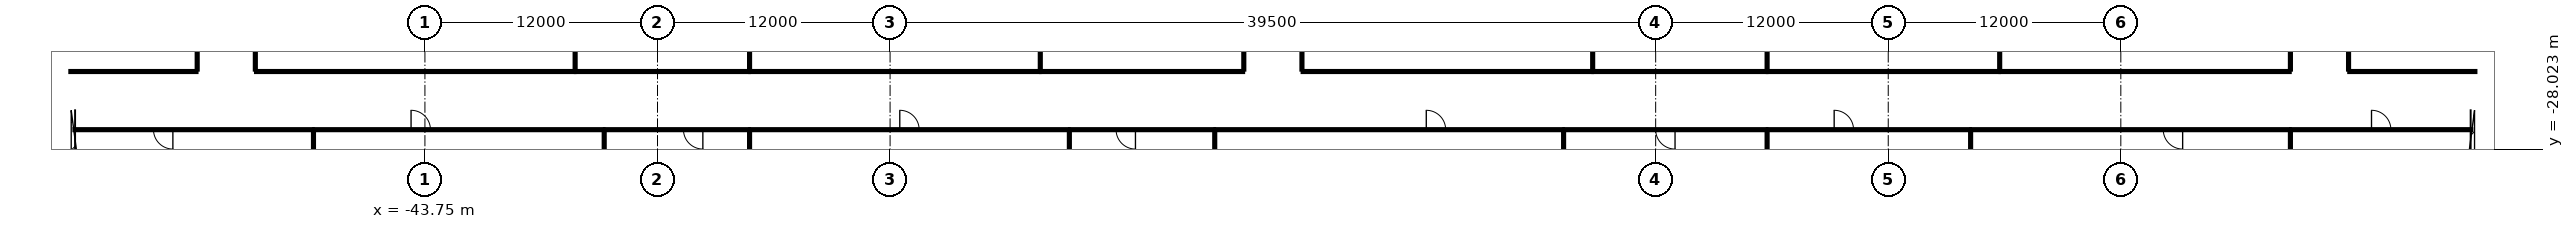
"""IFC4 building model, lengths in metres.
Left out: names, types, materials, properties, quantities, classifications, styles, units other than length and angle.
Written with IfcOpenShell. Run it as: python <this file> out.ifc"""

import sys

from ifc_helpers import new_model, si_unit, direction, frame, frame_2d, origin, origin_2d, place, context, subcontext, project, spatial, rectangle, hollow_rectangle, circle, extrude, element, fill, save


model = new_model("IFC4")
c1 = context("Model", 3, precision=1e-05, world=origin(), true_north=direction((0.0, 1.0)))
c2 = subcontext(c1, "Body", "Model", "MODEL_VIEW")
j1 = project(units=[si_unit("LENGTHUNIT", "METRE"), si_unit("PLANEANGLEUNIT", "RADIAN")], contexts=[c1])
p1 = place(None, origin())
s1 = spatial("IfcSite", under=j1, at=p1, CompositionType="ELEMENT")
p2 = place(p1, origin())
s2 = spatial("IfcBuilding", under=s1, at=p2, CompositionType="ELEMENT")
p3 = place(p2, frame((0.0, 0.0, 12.0)))
s3 = spatial("IfcBuildingStorey", under=s2, at=p3, CompositionType="ELEMENT", Elevation=12.0)
p4 = place(p3, frame((-59.4, -26.0, 0.0), z_axis=(0.0, 0.0, 1.0), x_axis=(1.0, 0.0, 0.0)))
e1 = element("IfcColumn", 1, at=p4, inside=s3, PredefinedType="COLUMN", context=c2, shape_type="SweptSolid", body=[
    extrude(circle(Radius=0.6, at=origin_2d()), origin(), (0.0, 0.0, 1.0), 4.2),
])
for number, where, z_axis, x_axis in (
    (2, (-54.6, -26.0, 0.0), (0.0, 0.0, 1.0), (1.0, 0.0, 0.0)),
    (3, (-37.8, -26.0, 0.0), (0.0, 0.0, 1.0), (1.0, 0.0, 0.0)),
    (4, (-21.0, -26.0, 0.0), (0.0, 0.0, 1.0), (1.0, 0.0, 0.0)),
    (5, (-4.2, -26.0, 0.0), (0.0, 0.0, 1.0), (1.0, 0.0, 0.0)),
    (6, (4.2, -26.0, 0.0), (0.0, 0.0, 1.0), (1.0, 0.0, 0.0)),
    (7, (12.6, -26.0, 0.0), (0.0, 0.0, 1.0), (1.0, 0.0, 0.0)),
    (8, (54.6, -26.0, 0.0), (0.0, 0.0, 1.0), (1.0, 0.0, 0.0)),
):
    element("IfcColumn", number, at=place(p3, frame(where, z_axis=z_axis, x_axis=x_axis)), inside=s3, PredefinedType="COLUMN", context=c2, shape_type="SweptSolid", body=[
        extrude(circle(Radius=0.6, at=origin_2d()), origin(), (0.0, 0.0, 1.0), 4.5),
    ])
p5 = place(p3, frame((59.4, -26.0, 0.0), z_axis=(0.0, 0.0, 1.0), x_axis=(1.0, 0.0, 0.0)))
e9 = element("IfcColumn", 9, at=p5, inside=s3, PredefinedType="COLUMN", context=c2, shape_type="SweptSolid", body=[
    extrude(circle(Radius=0.6, at=origin_2d()), origin(), (0.0, 0.0, 1.0), 4.2),
])
p6 = place(p3, frame((25.643, -22.79, 0.0), z_axis=(0.0, 0.0, 1.0), x_axis=(-0.258819045103, -0.965925826289, 0.0)))
e10 = element("IfcColumn", 10, at=p6, inside=s3, PredefinedType="COLUMN", context=c2, shape_type="SweptSolid", body=[
    extrude(hollow_rectangle(XDim=1.5, YDim=1.5, WallThickness=0.07, at=origin_2d()), origin(), (0.0, 0.0, 1.0), 4.5),
])
p7 = place(p3, frame((-61.868, -27.0, 0.0), z_axis=(0.0, 0.0, 1.0), x_axis=(1.0, 0.0, 0.0)))
e11 = element("IfcWall", 11, at=p7, inside=s3, PredefinedType="PARTITIONING", context=c2, shape_type="SweptSolid", body=[
    extrude(rectangle(XDim=12.368, YDim=0.125, at=frame_2d((6.184, 0.0))), origin(), (0.0, 0.0, 1.0), 2.68),
])
p8 = place(p7, frame((4.114, 0.0, 0.0)))
e12 = element("IfcOpeningElement", 12, at=p8, cuts=e11, PredefinedType="OPENING", context=c2, shape_type="SweptSolid", body=[
    extrude(rectangle(XDim=1.0, YDim=2.1, at=frame_2d((0.5, 1.05))), frame((0.0, 0.073, 0.0), z_axis=(0.0, -1.0, 0.0), x_axis=(1.0, 0.0, 0.0)), (0.0, 0.0, 1.0), 0.145),
])
p9 = place(p3, frame((-49.5, -27.0, 0.0), z_axis=(0.0, 0.0, 1.0), x_axis=(1.0, 0.0, 0.0)))
e13 = element("IfcWall", 13, at=p9, inside=s3, PredefinedType="PARTITIONING", context=c2, shape_type="SweptSolid", body=[
    extrude(rectangle(XDim=15.0, YDim=0.125, at=frame_2d((7.5, 0.0))), origin(), (0.0, 0.0, 1.0), 2.68),
])
p10 = place(p9, frame((5.035, 0.0, 0.0)))
e14 = element("IfcOpeningElement", 14, at=p10, cuts=e13, PredefinedType="OPENING", context=c2, shape_type="SweptSolid", body=[
    extrude(rectangle(XDim=1.0, YDim=2.4, at=frame_2d((0.5, 1.2))), frame((0.0, 0.073, 0.0), z_axis=(0.0, -1.0, 0.0), x_axis=(1.0, 0.0, 0.0)), (0.0, 0.0, 1.0), 0.145),
])
p11 = place(p3, frame((-34.5, -27.0, 0.0), z_axis=(0.0, 0.0, 1.0), x_axis=(1.0, 0.0, 0.0)))
e15 = element("IfcWall", 15, at=p11, inside=s3, PredefinedType="PARTITIONING", context=c2, shape_type="SweptSolid", body=[
    extrude(rectangle(XDim=7.5, YDim=0.125, at=frame_2d((3.75, 0.0))), origin(), (0.0, 0.0, 1.0), 2.68),
])
p12 = place(p11, frame((4.09, 0.0, 0.0)))
e16 = element("IfcOpeningElement", 16, at=p12, cuts=e15, PredefinedType="OPENING", context=c2, shape_type="SweptSolid", body=[
    extrude(rectangle(XDim=1.0, YDim=2.1, at=frame_2d((0.5, 1.05))), frame((0.0, 0.073, 0.0), z_axis=(0.0, -1.0, 0.0), x_axis=(1.0, 0.0, 0.0)), (0.0, 0.0, 1.0), 0.145),
])
p13 = place(p3, frame((-27.0, -27.0, 0.0), z_axis=(0.0, 0.0, 1.0), x_axis=(1.0, 0.0, 0.0)))
e17 = element("IfcWall", 17, at=p13, inside=s3, PredefinedType="PARTITIONING", context=c2, shape_type="SweptSolid", body=[
    extrude(rectangle(XDim=16.5, YDim=0.125, at=frame_2d((8.25, 0.0))), origin(), (0.0, 0.0, 1.0), 2.68),
])
p14 = place(p13, frame((7.75, 0.0, 0.0)))
e18 = element("IfcOpeningElement", 18, at=p14, cuts=e17, PredefinedType="OPENING", context=c2, shape_type="SweptSolid", body=[
    extrude(rectangle(XDim=1.0, YDim=2.1, at=frame_2d((0.5, 1.05))), frame((0.0, 0.073, 0.0), z_axis=(0.0, -1.0, 0.0), x_axis=(1.0, 0.0, 0.0)), (0.0, 0.0, 1.0), 0.145),
])
p15 = place(p3, frame((-10.5, -27.0, 0.0), z_axis=(0.0, 0.0, 1.0), x_axis=(1.0, 0.0, 0.0)))
e19 = element("IfcWall", 19, at=p15, inside=s3, PredefinedType="PARTITIONING", context=c2, shape_type="SweptSolid", body=[
    extrude(rectangle(XDim=7.5, YDim=0.125, at=frame_2d((3.75, 0.0))), origin(), (0.0, 0.0, 1.0), 2.68),
])
p16 = place(p15, frame((2.41, 0.0, 0.0)))
e20 = element("IfcOpeningElement", 20, at=p16, cuts=e19, PredefinedType="OPENING", context=c2, shape_type="SweptSolid", body=[
    extrude(rectangle(XDim=1.0, YDim=2.1, at=frame_2d((0.5, 1.05))), frame((0.0, 0.073, 0.0), z_axis=(0.0, -1.0, 0.0), x_axis=(1.0, 0.0, 0.0)), (0.0, 0.0, 1.0), 0.145),
])
p17 = place(p3, frame((-3.0, -27.0, 0.0), z_axis=(0.0, 0.0, 1.0), x_axis=(1.0, 0.0, 0.0)))
e21 = element("IfcWall", 21, at=p17, inside=s3, PredefinedType="PARTITIONING", context=c2, shape_type="SweptSolid", body=[
    extrude(rectangle(XDim=18.0, YDim=0.125, at=frame_2d((9.0, 0.0))), origin(), (0.0, 0.0, 1.0), 2.68),
])
p18 = place(p17, frame((10.915, 0.0, 0.0)))
e22 = element("IfcOpeningElement", 22, at=p18, cuts=e21, PredefinedType="OPENING", context=c2, shape_type="SweptSolid", body=[
    extrude(rectangle(XDim=1.0, YDim=2.1, at=frame_2d((0.5, 1.05))), frame((0.0, 0.073, 0.0), z_axis=(0.0, -1.0, 0.0), x_axis=(1.0, 0.0, 0.0)), (0.0, 0.0, 1.0), 0.145),
])
p19 = place(p3, frame((15.0, -27.0, 0.0), z_axis=(0.0, 0.0, 1.0), x_axis=(1.0, 0.0, 0.0)))
e23 = element("IfcWall", 23, at=p19, inside=s3, PredefinedType="PARTITIONING", context=c2, shape_type="SweptSolid", body=[
    extrude(rectangle(XDim=10.5, YDim=0.125, at=frame_2d((5.25, 0.0))), origin(), (0.0, 0.0, 1.0), 2.68),
])
p20 = place(p19, frame((4.75, 0.0, 0.0)))
e24 = element("IfcOpeningElement", 24, at=p20, cuts=e23, PredefinedType="OPENING", context=c2, shape_type="SweptSolid", body=[
    extrude(rectangle(XDim=1.0, YDim=2.4, at=frame_2d((0.5, 1.2))), frame((0.0, 0.073, 0.0), z_axis=(0.0, -1.0, 0.0), x_axis=(1.0, 0.0, 0.0)), (0.0, 0.0, 1.0), 0.145),
])
p21 = place(p3, frame((25.5, -27.0, 0.0), z_axis=(0.0, 0.0, 1.0), x_axis=(1.0, 0.0, 0.0)))
e25 = element("IfcWall", 25, at=p21, inside=s3, PredefinedType="PARTITIONING", context=c2, shape_type="SweptSolid", body=[
    extrude(rectangle(XDim=10.5, YDim=0.125, at=frame_2d((5.25, 0.0))), origin(), (0.0, 0.0, 1.0), 2.68),
])
p22 = place(p21, frame((3.46, 0.0, 0.0)))
e26 = element("IfcOpeningElement", 26, at=p22, cuts=e25, PredefinedType="OPENING", context=c2, shape_type="SweptSolid", body=[
    extrude(rectangle(XDim=1.0, YDim=2.1, at=frame_2d((0.5, 1.05))), frame((0.0, 0.073, 0.0), z_axis=(0.0, -1.0, 0.0), x_axis=(1.0, 0.0, 0.0)), (0.0, 0.0, 1.0), 0.145),
])
p23 = place(p3, frame((36.0, -27.0, 0.0), z_axis=(0.0, 0.0, 1.0), x_axis=(1.0, 0.0, 0.0)))
e27 = element("IfcWall", 27, at=p23, inside=s3, PredefinedType="PARTITIONING", context=c2, shape_type="SweptSolid", body=[
    extrude(rectangle(XDim=16.5, YDim=0.125, at=frame_2d((8.25, 0.0))), origin(), (0.0, 0.0, 1.0), 2.68),
])
p24 = place(p23, frame((9.94, 0.0, 0.0)))
e28 = element("IfcOpeningElement", 28, at=p24, cuts=e27, PredefinedType="OPENING", context=c2, shape_type="SweptSolid", body=[
    extrude(rectangle(XDim=1.0, YDim=2.1, at=frame_2d((0.5, 1.05))), frame((0.0, 0.073, 0.0), z_axis=(0.0, -1.0, 0.0), x_axis=(1.0, 0.0, 0.0)), (0.0, 0.0, 1.0), 0.145),
])
p25 = place(p3, frame((52.5, -27.0, 0.0), z_axis=(0.0, 0.0, 1.0), x_axis=(1.0, 0.0, 0.0)))
e29 = element("IfcWall", 29, at=p25, inside=s3, PredefinedType="PARTITIONING", context=c2, shape_type="SweptSolid", body=[
    extrude(rectangle(XDim=9.368, YDim=0.125, at=frame_2d((4.684, 0.0))), origin(), (0.0, 0.0, 1.0), 2.68),
])
p26 = place(p25, frame((4.184, 0.0, 0.0)))
e30 = element("IfcOpeningElement", 30, at=p26, cuts=e29, PredefinedType="OPENING", context=c2, shape_type="SweptSolid", body=[
    extrude(rectangle(XDim=1.0, YDim=2.1, at=frame_2d((0.5, 1.05))), frame((0.0, 0.073, 0.0), z_axis=(0.0, -1.0, 0.0), x_axis=(1.0, 0.0, 0.0)), (0.0, 0.0, 1.0), 0.145),
])
p27 = place(p3, frame((-55.5, -24.0, 0.0), z_axis=(0.0, 0.0, 1.0), x_axis=(-1.0, 0.0, 0.0)))
e31 = element("IfcWall", 31, at=p27, inside=s3, PredefinedType="PARTITIONING", context=c2, shape_type="SweptSolid", body=[
    extrude(rectangle(XDim=6.58, YDim=0.125, at=frame_2d((3.29, 0.0))), origin(), (0.0, 0.0, 1.0), 2.68),
])
p28 = place(p3, frame((-36.0, -24.0, 0.0), z_axis=(0.0, 0.0, 1.0), x_axis=(-1.0, 0.0, 0.0)))
e32 = element("IfcWall", 32, at=p28, inside=s3, PredefinedType="PARTITIONING", context=c2, shape_type="SweptSolid", body=[
    extrude(rectangle(XDim=16.5, YDim=0.125, at=frame_2d((8.25, 0.0))), origin(), (0.0, 0.0, 1.0), 2.68),
])
p29 = place(p3, frame((-27.0, -24.0, 0.0), z_axis=(0.0, 0.0, 1.0), x_axis=(-1.0, 0.0, 0.0)))
e33 = element("IfcWall", 33, at=p29, inside=s3, PredefinedType="PARTITIONING", context=c2, shape_type="SweptSolid", body=[
    extrude(rectangle(XDim=9.0, YDim=0.125, at=frame_2d((4.5, 0.0))), origin(), (0.0, 0.0, 1.0), 2.68),
])
p30 = place(p3, frame((-12.0, -24.0, 0.0), z_axis=(0.0, 0.0, 1.0), x_axis=(-1.0, 0.0, 0.0)))
e34 = element("IfcWall", 34, at=p30, inside=s3, PredefinedType="PARTITIONING", context=c2, shape_type="SweptSolid", body=[
    extrude(rectangle(XDim=15.0, YDim=0.125, at=frame_2d((7.5, 0.0))), origin(), (0.0, 0.0, 1.0), 2.68),
])
p31 = place(p3, frame((-1.5, -24.0, 0.0), z_axis=(0.0, 0.0, 1.0), x_axis=(-1.0, 0.0, 0.0)))
e35 = element("IfcWall", 35, at=p31, inside=s3, PredefinedType="PARTITIONING", context=c2, shape_type="SweptSolid", body=[
    extrude(rectangle(XDim=10.5, YDim=0.125, at=frame_2d((5.25, 0.0))), origin(), (0.0, 0.0, 1.0), 2.68),
])
p32 = place(p3, frame((16.5, -24.0, 0.0), z_axis=(0.0, 0.0, 1.0), x_axis=(-1.0, 0.0, 0.0)))
e36 = element("IfcWall", 36, at=p32, inside=s3, PredefinedType="PARTITIONING", context=c2, shape_type="SweptSolid", body=[
    extrude(rectangle(XDim=15.0, YDim=0.125, at=frame_2d((7.5, 0.0))), origin(), (0.0, 0.0, 1.0), 2.68),
])
p33 = place(p3, frame((25.5, -24.0, 0.0), z_axis=(0.0, 0.0, 1.0), x_axis=(-1.0, 0.0, 0.0)))
e37 = element("IfcWall", 37, at=p33, inside=s3, PredefinedType="PARTITIONING", context=c2, shape_type="SweptSolid", body=[
    extrude(rectangle(XDim=9.0, YDim=0.125, at=frame_2d((4.5, 0.0))), origin(), (0.0, 0.0, 1.0), 4.2),
])
p34 = place(p3, frame((37.5, -24.0, 0.0), z_axis=(0.0, 0.0, 1.0), x_axis=(-1.0, 0.0, 0.0)))
e38 = element("IfcWall", 38, at=p34, inside=s3, PredefinedType="PARTITIONING", context=c2, shape_type="SweptSolid", body=[
    extrude(rectangle(XDim=12.0, YDim=0.125, at=frame_2d((6.0, 0.0))), origin(), (0.0, 0.0, 1.0), 2.68),
])
p35 = place(p3, frame((52.5, -24.0, 0.0), z_axis=(0.0, 0.0, 1.0), x_axis=(-1.0, 0.0, 0.0)))
e39 = element("IfcWall", 39, at=p35, inside=s3, PredefinedType="PARTITIONING", context=c2, shape_type="SweptSolid", body=[
    extrude(rectangle(XDim=15.0, YDim=0.125, at=frame_2d((7.5, 0.0))), origin(), (0.0, 0.0, 1.0), 4.2),
])
p36 = place(p3, frame((62.08, -24.0, 0.0), z_axis=(0.0, 0.0, 1.0), x_axis=(-1.0, 0.0, 0.0)))
e40 = element("IfcWall", 40, at=p36, inside=s3, PredefinedType="PARTITIONING", context=c2, shape_type="SweptSolid", body=[
    extrude(rectangle(XDim=6.58, YDim=0.125, at=frame_2d((3.29, 0.0))), origin(), (0.0, 0.0, 1.0), 2.68),
])
p37 = place(p3, frame((-55.5, -11.062, 0.0), z_axis=(0.0, 0.0, 1.0), x_axis=(0.0, -1.0, 0.0)))
e41 = element("IfcWall", 41, at=p37, inside=s3, PredefinedType="PARTITIONING", context=c2, shape_type="SweptSolid", body=[
    extrude(rectangle(XDim=12.875, YDim=0.125, at=frame_2d((6.438, 0.0))), origin(), (0.0, 0.0, 1.0), 2.68),
])
p38 = place(p37, frame((4.291, 0.0, 0.0)))
e42 = element("IfcOpeningElement", 42, at=p38, cuts=e41, PredefinedType="OPENING", context=c2, shape_type="SweptSolid", body=[
    extrude(rectangle(XDim=1.0, YDim=2.1, at=frame_2d((0.5, 1.05))), frame((0.0, 0.073, 0.0), z_axis=(0.0, -1.0, 0.0), x_axis=(1.0, 0.0, 0.0)), (0.0, 0.0, 1.0), 0.145),
])
p39 = place(p3, frame((-52.5, -23.938, 0.0), z_axis=(0.0, 0.0, 1.0), x_axis=(0.0, 1.0, 0.0)))
e43 = element("IfcWall", 43, at=p39, inside=s3, PredefinedType="PARTITIONING", context=c2, shape_type="SweptSolid", body=[
    extrude(rectangle(XDim=12.875, YDim=0.125, at=frame_2d((6.438, 0.0))), origin(), (0.0, 0.0, 1.0), 2.68),
])
p40 = place(p3, frame((-1.5, -11.062, 0.0), z_axis=(0.0, 0.0, 1.0), x_axis=(0.0, -1.0, 0.0)))
e44 = element("IfcWall", 44, at=p40, inside=s3, PredefinedType="PARTITIONING", context=c2, shape_type="SweptSolid", body=[
    extrude(rectangle(XDim=12.875, YDim=0.125, at=frame_2d((6.438, 0.0))), origin(), (0.0, 0.0, 1.0), 2.68),
])
p41 = place(p40, frame((7.584, 0.0, 0.0)))
e45 = element("IfcOpeningElement", 45, at=p41, cuts=e44, PredefinedType="OPENING", context=c2, shape_type="SweptSolid", body=[
    extrude(rectangle(XDim=1.0, YDim=2.1, at=frame_2d((0.5, 1.05))), frame((0.0, 0.073, 0.0), z_axis=(0.0, -1.0, 0.0), x_axis=(1.0, 0.0, 0.0)), (0.0, 0.0, 1.0), 0.145),
])
for number, where, z_axis, x_axis in (
    (46, (1.5, -23.938, 0.0), (0.0, 0.0, 1.0), (0.0, 1.0, 0.0)),
    (47, (52.5, -11.062, 0.0), (0.0, 0.0, 1.0), (0.0, -1.0, 0.0)),
):
    element("IfcWall", number, at=place(p3, frame(where, z_axis=z_axis, x_axis=x_axis)), inside=s3, PredefinedType="PARTITIONING", context=c2, shape_type="SweptSolid", body=[
        extrude(rectangle(XDim=12.875, YDim=0.125, at=frame_2d((6.438, 0.0))), origin(), (0.0, 0.0, 1.0), 2.68),
    ])
p42 = place(p3, frame((55.5, -23.938, 0.0), z_axis=(0.0, 0.0, 1.0), x_axis=(0.0, 1.0, 0.0)))
e48 = element("IfcWall", 48, at=p42, inside=s3, PredefinedType="PARTITIONING", context=c2, shape_type="SweptSolid", body=[
    extrude(rectangle(XDim=12.875, YDim=0.125, at=frame_2d((6.438, 0.0))), origin(), (0.0, 0.0, 1.0), 2.68),
])
p43 = place(p42, frame((4.291, 0.0, 0.0)))
e49 = element("IfcOpeningElement", 49, at=p43, cuts=e48, PredefinedType="OPENING", context=c2, shape_type="SweptSolid", body=[
    extrude(rectangle(XDim=1.0, YDim=2.1, at=frame_2d((0.5, 1.05))), frame((0.0, 0.073, 0.0), z_axis=(0.0, -1.0, 0.0), x_axis=(1.0, 0.0, 0.0)), (0.0, 0.0, 1.0), 0.145),
])
p44 = place(p3, frame((-49.5, -38.08, 0.0), z_axis=(0.0, 0.0, 1.0), x_axis=(0.0, 1.0, 0.0)))
e50 = element("IfcWall", 50, at=p44, inside=s3, PredefinedType="PARTITIONING", context=c2, shape_type="SweptSolid", body=[
    extrude(rectangle(XDim=11.018, YDim=0.125, at=frame_2d((5.509, 0.0))), origin(), (0.0, 0.0, 1.0), 4.2),
])
for number, where, z_axis, x_axis in (
    (51, (-34.5, -38.08, 0.0), (0.0, 0.0, 1.0), (0.0, 1.0, 0.0)),
    (52, (-27.0, -38.08, 0.0), (0.0, 0.0, 1.0), (0.0, 1.0, 0.0)),
    (53, (-10.5, -38.08, 0.0), (0.0, 0.0, 1.0), (0.0, 1.0, 0.0)),
    (54, (-3.0, -38.08, 0.0), (0.0, 0.0, 1.0), (0.0, 1.0, 0.0)),
    (55, (15.0, -38.08, 0.0), (0.0, 0.0, 1.0), (0.0, 1.0, 0.0)),
    (56, (25.5, -38.08, 0.0), (0.0, 0.0, 1.0), (0.0, 1.0, 0.0)),
    (57, (36.0, -38.08, 0.0), (0.0, 0.0, 1.0), (0.0, 1.0, 0.0)),
):
    element("IfcWall", number, at=place(p3, frame(where, z_axis=z_axis, x_axis=x_axis)), inside=s3, PredefinedType="PARTITIONING", context=c2, shape_type="SweptSolid", body=[
        extrude(rectangle(XDim=11.018, YDim=0.125, at=frame_2d((5.509, 0.0))), origin(), (0.0, 0.0, 1.0), 2.68),
    ])
p45 = place(p3, frame((52.5, -37.671, 0.0), z_axis=(0.0, 0.0, 1.0), x_axis=(0.0, 1.0, 0.0)))
e58 = element("IfcWall", 58, at=p45, inside=s3, PredefinedType="PARTITIONING", context=c2, shape_type="SweptSolid", body=[
    extrude(rectangle(XDim=10.608, YDim=0.125, at=frame_2d((5.304, 0.0))), origin(), (0.0, 0.0, 1.0), 4.2),
])
for number, where, z_axis, x_axis in (
    (59, (-36.0, -23.938, 0.0), (0.0, 0.0, 1.0), (0.0, 1.0, 0.0)),
    (60, (-27.0, -23.938, 0.0), (0.0, 0.0, 1.0), (0.0, 1.0, 0.0)),
):
    element("IfcWall", number, at=place(p3, frame(where, z_axis=z_axis, x_axis=x_axis)), inside=s3, PredefinedType="PARTITIONING", context=c2, shape_type="SweptSolid", body=[
        extrude(rectangle(XDim=12.875, YDim=0.125, at=frame_2d((6.438, 0.0))), origin(), (0.0, 0.0, 1.0), 3.496),
    ])
p46 = place(p3, frame((-12.0, -23.938, 0.0), z_axis=(0.0, 0.0, 1.0), x_axis=(0.0, 1.0, 0.0)))
e61 = element("IfcWall", 61, at=p46, inside=s3, PredefinedType="PARTITIONING", context=c2, shape_type="SweptSolid", body=[
    extrude(rectangle(XDim=12.875, YDim=0.125, at=frame_2d((6.438, 0.0))), origin(), (0.0, 0.0, 1.0), 3.727),
])
for number, where, z_axis, x_axis in (
    (62, (16.5, -23.938, 0.0), (0.0, 0.0, 1.0), (0.0, 1.0, 0.0)),
    (63, (25.5, -23.938, 0.0), (0.0, 0.0, 1.0), (0.0, 1.0, 0.0)),
    (64, (37.5, -23.938, 0.0), (0.0, 0.0, 1.0), (0.0, 1.0, 0.0)),
):
    element("IfcWall", number, at=place(p3, frame(where, z_axis=z_axis, x_axis=x_axis)), inside=s3, PredefinedType="PARTITIONING", context=c2, shape_type="SweptSolid", body=[
        extrude(rectangle(XDim=12.875, YDim=0.125, at=frame_2d((6.438, 0.0))), origin(), (0.0, 0.0, 1.0), 3.496),
    ])
p47 = place(p8, origin())
e65 = element("IfcDoor", 65, at=p47, inside=s3, OperationType="SINGLE_SWING_RIGHT", PredefinedType="DOOR", context=c2, shape_type="SweptSolid", body=[
    extrude(rectangle(XDim=1.0, YDim=2.1, at=frame_2d((0.5, 1.05))), frame((0.0, 0.025, 0.0), z_axis=(0.0, -1.0, 0.0), x_axis=(1.0, 0.0, 0.0)), (0.0, 0.0, 1.0), 0.05),
])
fill(e12, e65)
p48 = place(p10, origin())
e66 = element("IfcDoor", 66, at=p48, inside=s3, OperationType="SINGLE_SWING_LEFT", PredefinedType="DOOR", context=c2, shape_type="SweptSolid", body=[
    extrude(rectangle(XDim=1.0, YDim=2.4, at=frame_2d((0.5, 1.2))), frame((0.0, 0.025, 0.0), z_axis=(0.0, -1.0, 0.0), x_axis=(1.0, 0.0, 0.0)), (0.0, 0.0, 1.0), 0.05),
])
fill(e14, e66)
p49 = place(p12, origin())
e67 = element("IfcDoor", 67, at=p49, inside=s3, OperationType="SINGLE_SWING_RIGHT", PredefinedType="DOOR", context=c2, shape_type="SweptSolid", body=[
    extrude(rectangle(XDim=1.0, YDim=2.1, at=frame_2d((0.5, 1.05))), frame((0.0, 0.025, 0.0), z_axis=(0.0, -1.0, 0.0), x_axis=(1.0, 0.0, 0.0)), (0.0, 0.0, 1.0), 0.05),
])
fill(e16, e67)
p50 = place(p14, origin())
e68 = element("IfcDoor", 68, at=p50, inside=s3, OperationType="SINGLE_SWING_LEFT", PredefinedType="DOOR", context=c2, shape_type="SweptSolid", body=[
    extrude(rectangle(XDim=1.0, YDim=2.1, at=frame_2d((0.5, 1.05))), frame((0.0, 0.025, 0.0), z_axis=(0.0, -1.0, 0.0), x_axis=(1.0, 0.0, 0.0)), (0.0, 0.0, 1.0), 0.05),
])
fill(e18, e68)
p51 = place(p16, origin())
e69 = element("IfcDoor", 69, at=p51, inside=s3, OperationType="SINGLE_SWING_RIGHT", PredefinedType="DOOR", context=c2, shape_type="SweptSolid", body=[
    extrude(rectangle(XDim=1.0, YDim=2.1, at=frame_2d((0.5, 1.05))), frame((0.0, 0.025, 0.0), z_axis=(0.0, -1.0, 0.0), x_axis=(1.0, 0.0, 0.0)), (0.0, 0.0, 1.0), 0.05),
])
fill(e20, e69)
p52 = place(p18, origin())
e70 = element("IfcDoor", 70, at=p52, inside=s3, OperationType="SINGLE_SWING_LEFT", PredefinedType="DOOR", context=c2, shape_type="SweptSolid", body=[
    extrude(rectangle(XDim=1.0, YDim=2.1, at=frame_2d((0.5, 1.05))), frame((0.0, 0.025, 0.0), z_axis=(0.0, -1.0, 0.0), x_axis=(1.0, 0.0, 0.0)), (0.0, 0.0, 1.0), 0.05),
])
fill(e22, e70)
p53 = place(p20, origin())
e71 = element("IfcDoor", 71, at=p53, inside=s3, OperationType="SINGLE_SWING_RIGHT", PredefinedType="DOOR", context=c2, shape_type="SweptSolid", body=[
    extrude(rectangle(XDim=1.0, YDim=2.4, at=frame_2d((0.5, 1.2))), frame((0.0, 0.025, 0.0), z_axis=(0.0, -1.0, 0.0), x_axis=(1.0, 0.0, 0.0)), (0.0, 0.0, 1.0), 0.05),
])
fill(e24, e71)
p54 = place(p22, origin())
e72 = element("IfcDoor", 72, at=p54, inside=s3, OperationType="SINGLE_SWING_LEFT", PredefinedType="DOOR", context=c2, shape_type="SweptSolid", body=[
    extrude(rectangle(XDim=1.0, YDim=2.1, at=frame_2d((0.5, 1.05))), frame((0.0, 0.025, 0.0), z_axis=(0.0, -1.0, 0.0), x_axis=(1.0, 0.0, 0.0)), (0.0, 0.0, 1.0), 0.05),
])
fill(e26, e72)
p55 = place(p24, origin())
e73 = element("IfcDoor", 73, at=p55, inside=s3, OperationType="SINGLE_SWING_RIGHT", PredefinedType="DOOR", context=c2, shape_type="SweptSolid", body=[
    extrude(rectangle(XDim=1.0, YDim=2.1, at=frame_2d((0.5, 1.05))), frame((0.0, 0.025, 0.0), z_axis=(0.0, -1.0, 0.0), x_axis=(1.0, 0.0, 0.0)), (0.0, 0.0, 1.0), 0.05),
])
fill(e28, e73)
p56 = place(p26, origin())
e74 = element("IfcDoor", 74, at=p56, inside=s3, OperationType="SINGLE_SWING_LEFT", PredefinedType="DOOR", context=c2, shape_type="SweptSolid", body=[
    extrude(rectangle(XDim=1.0, YDim=2.1, at=frame_2d((0.5, 1.05))), frame((0.0, 0.025, 0.0), z_axis=(0.0, -1.0, 0.0), x_axis=(1.0, 0.0, 0.0)), (0.0, 0.0, 1.0), 0.05),
])
fill(e30, e74)
save(model, sys.argv[1])
